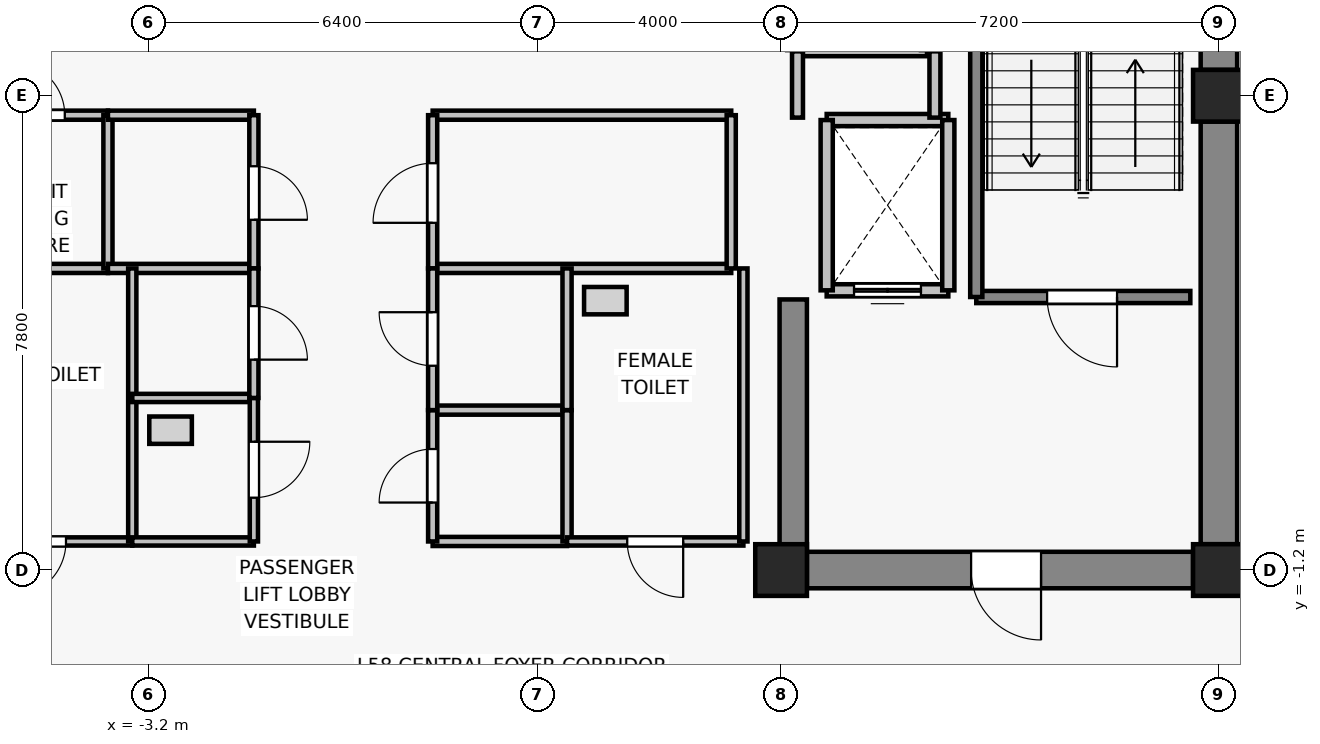
"""IFC4 building model, lengths in metres.
Left out: names, types, materials, properties, quantities, classifications, styles, units other than length and angle.
Written with IfcOpenShell. Run it as: python <this file> out.ifc"""

import sys

from ifc_helpers import new_model, si_unit, direction, frame, frame_2d, origin, origin_2d, place, context, subcontext, project, spatial, rectangle, extrude, source, transform, mapped, element, fill, save


model = new_model("IFC4")
c1 = context("Model", 3, precision=1e-05, world=origin(), true_north=direction((0.0, 1.0)))
c2 = subcontext(c1, "Body", "Model", "MODEL_VIEW")
j1 = project(units=[si_unit("LENGTHUNIT", "METRE"), si_unit("PLANEANGLEUNIT", "RADIAN")], contexts=[c1])
p1 = place(None, origin())
s1 = spatial("IfcSite", under=j1, at=p1, CompositionType="ELEMENT")
p2 = place(p1, origin())
s2 = spatial("IfcBuilding", under=s1, at=p2, CompositionType="ELEMENT")
p3 = place(p2, frame((0.0, 0.0, 208.9)))
s3 = spatial("IfcBuildingStorey", under=s2, at=p3, CompositionType="ELEMENT", Elevation=208.9)
for number, where, z_axis, x_axis in (
    (1, (7.2, -1.2, 0.0), (0.0, 0.0, 1.0), (1.0, 0.0, 0.0)),
    (2, (14.4, -1.2, 0.0), (0.0, 0.0, 1.0), (1.0, 0.0, 0.0)),
    (3, (14.4, 6.6, 0.0), (0.0, 0.0, 1.0), (1.0, 0.0, 0.0)),
):
    element("IfcColumn", number, at=place(p3, frame(where, z_axis=z_axis, x_axis=x_axis)), inside=s3, PredefinedType="COLUMN", context=c2, shape_type="SweptSolid", body=[
        extrude(rectangle(XDim=0.85, YDim=0.85, at=origin_2d()), origin(), (0.0, 0.0, 1.0), 3.3),
    ])
p4 = place(p3, frame((14.4, -0.775, 0.0), z_axis=(0.0, 0.0, 1.0), x_axis=(0.0, 1.0, 0.0)))
e4 = element("IfcWall", 4, at=p4, inside=s3, PredefinedType="SHEAR", context=c2, shape_type="SweptSolid", body=[
    extrude(rectangle(XDim=6.95, YDim=0.6, at=frame_2d((3.475, 0.0))), origin(), (0.0, 0.0, 1.0), 3.075),
])
p5 = place(p3, frame((14.4, 7.025, 0.0), z_axis=(0.0, 0.0, 1.0), x_axis=(0.0, 1.0, 0.0)))
e5 = element("IfcWall", 5, at=p5, inside=s3, PredefinedType="SHEAR", context=c2, shape_type="SweptSolid", body=[
    extrude(rectangle(XDim=6.05, YDim=0.6, at=frame_2d((3.025, 0.0))), origin(), (0.0, 0.0, 1.0), 3.075),
])
p6 = place(p3, frame((13.975, -1.2, 0.0), z_axis=(0.0, 0.0, 1.0), x_axis=(-1.0, 0.0, 0.0)))
e6 = element("IfcWall", 6, at=p6, inside=s3, PredefinedType="SHEAR", context=c2, shape_type="SweptSolid", body=[
    extrude(rectangle(XDim=6.35, YDim=0.6, at=frame_2d((3.175, 0.0))), origin(), (0.0, 0.0, 1.0), 3.075),
])
p7 = place(p6, frame((2.5, 0.0, 0.0)))
e7 = element("IfcOpeningElement", 7, at=p7, cuts=e6, PredefinedType="OPENING", context=c2, shape_type="SweptSolid", body=[
    extrude(rectangle(XDim=1.15, YDim=2.15, at=frame_2d((0.575, 1.075))), frame((0.0, 0.31, 0.0), z_axis=(0.0, -1.0, 0.0), x_axis=(1.0, 0.0, 0.0)), (0.0, 0.0, 1.0), 0.62),
])
p8 = place(p3, frame((7.4, -0.9, 0.0), z_axis=(0.0, 0.0, 1.0), x_axis=(0.0, 1.0, 0.0)))
e8 = element("IfcWall", 8, at=p8, inside=s3, PredefinedType="SHEAR", context=c2, shape_type="SweptSolid", body=[
    extrude(rectangle(XDim=4.15, YDim=0.45, at=frame_2d((2.075, 0.0))), origin(), (0.0, 0.0, 1.0), 3.075),
])
p9 = place(p3, frame((9.95, 3.4, 0.0), z_axis=(0.0, 0.0, 1.0), x_axis=(-1.0, 0.0, 0.0)))
e9 = element("IfcWall", 9, at=p9, inside=s3, PredefinedType="SOLIDWALL", context=c2, shape_type="SweptSolid", body=[
    extrude(rectangle(XDim=2.0, YDim=0.2, at=frame_2d((1.0, 0.0))), origin(), (0.0, 0.0, 1.0), 3.075),
])
p10 = place(p9, frame((0.45, 0.0, 0.0)))
e10 = element("IfcOpeningElement", 10, at=p10, cuts=e9, PredefinedType="OPENING", context=c2, shape_type="SweptSolid", body=[
    extrude(rectangle(XDim=1.1, YDim=2.2, at=frame_2d((0.55, 1.1))), frame((0.0, 0.11, 0.0), z_axis=(0.0, -1.0, 0.0), x_axis=(1.0, 0.0, 0.0)), (0.0, 0.0, 1.0), 0.22),
])
p11 = place(p3, frame((7.95, 6.2, 0.0), z_axis=(0.0, 0.0, 1.0), x_axis=(1.0, 0.0, 0.0)))
e11 = element("IfcWall", 11, at=p11, inside=s3, PredefinedType="SOLIDWALL", context=c2, shape_type="SweptSolid", body=[
    extrude(rectangle(XDim=2.0, YDim=0.2, at=frame_2d((1.0, 0.0))), origin(), (0.0, 0.0, 1.0), 3.075),
])
for number, where, z_axis, x_axis in (
    (12, (7.95, 3.4, 0.0), (0.0, 0.0, 1.0), (0.0, 1.0, 0.0)),
    (13, (9.95, 6.2, 0.0), (0.0, 0.0, 1.0), (0.0, -1.0, 0.0)),
):
    element("IfcWall", number, at=place(p3, frame(where, z_axis=z_axis, x_axis=x_axis)), inside=s3, PredefinedType="SOLIDWALL", context=c2, shape_type="SweptSolid", body=[
        extrude(rectangle(XDim=2.8, YDim=0.2, at=frame_2d((1.4, 0.0))), origin(), (0.0, 0.0, 1.0), 3.075),
    ])
p12 = place(p3, frame((9.6, 7.35, 0.0), z_axis=(0.0, 0.0, 1.0), x_axis=(-1.0, 0.0, 0.0)))
e14 = element("IfcWall", 14, at=p12, inside=s3, PredefinedType="SOLIDWALL", context=c2, shape_type="SweptSolid", body=[
    extrude(rectangle(XDim=2.2, YDim=0.2, at=frame_2d((1.1, 0.0))), origin(), (0.0, 0.0, 1.0), 2.615),
])
p13 = place(p3, frame((13.93, 3.29, 0.0), z_axis=(0.0, 0.0, 1.0), x_axis=(-1.0, 0.0, 0.0)))
e15 = element("IfcWall", 15, at=p13, inside=s3, PredefinedType="SOLIDWALL", context=c2, shape_type="SweptSolid", body=[
    extrude(rectangle(XDim=3.52, YDim=0.2, at=frame_2d((1.76, 0.0))), origin(), (0.0, 0.0, 1.0), 3.075),
])
p14 = place(p13, frame((1.205, 0.0, 0.0)))
e16 = element("IfcOpeningElement", 16, at=p14, cuts=e15, PredefinedType="OPENING", context=c2, shape_type="SweptSolid", body=[
    extrude(rectangle(XDim=1.15, YDim=2.15, at=frame_2d((0.575, 1.075))), frame((0.0, 0.11, 0.0), z_axis=(0.0, -1.0, 0.0), x_axis=(1.0, 0.0, 0.0)), (0.0, 0.0, 1.0), 0.22),
])
p15 = place(p3, frame((10.41, 3.29, 0.0), z_axis=(0.0, 0.0, 1.0), x_axis=(0.0, 1.0, 0.0)))
e17 = element("IfcWall", 17, at=p15, inside=s3, PredefinedType="SOLIDWALL", context=c2, shape_type="SweptSolid", body=[
    extrude(rectangle(XDim=8.84, YDim=0.2, at=frame_2d((4.42, 0.0))), origin(), (0.0, 0.0, 1.0), 3.075),
])
p16 = place(p3, frame((7.47, 6.24, 0.0), z_axis=(0.0, 0.0, 1.0), x_axis=(0.0, 1.0, 0.0)))
e18 = element("IfcWall", 18, at=p16, inside=s3, PredefinedType="PARTITIONING", context=c2, shape_type="SweptSolid", body=[
    extrude(rectangle(XDim=1.09, YDim=0.18, at=frame_2d((0.545, 0.0))), origin(), (0.0, 0.0, 1.0), 2.615),
])
p17 = place(p3, frame((9.73, 7.33, 0.0), z_axis=(0.0, 0.0, 1.0), x_axis=(0.0, -1.0, 0.0)))
e19 = element("IfcWall", 19, at=p17, inside=s3, PredefinedType="PARTITIONING", context=c2, shape_type="SweptSolid", body=[
    extrude(rectangle(XDim=1.09, YDim=0.18, at=frame_2d((0.545, 0.0))), origin(), (0.0, 0.0, 1.0), 3.075),
])
p18 = place(p3, frame((-3.87, 3.76, 0.0), z_axis=(0.0, 0.0, 1.0), x_axis=(-1.0, 0.0, 0.0)))
e20 = element("IfcWall", 20, at=p18, inside=s3, PredefinedType="PARTITIONING", context=c2, shape_type="SweptSolid", body=[
    extrude(rectangle(XDim=2.31, YDim=0.15, at=frame_2d((1.155, 0.0))), origin(), (0.0, 0.0, 1.0), 3.075),
])
p19 = place(p3, frame((-6.18, 6.28, 0.0), z_axis=(0.0, 0.0, 1.0), x_axis=(1.0, 0.0, 0.0)))
e21 = element("IfcWall", 21, at=p19, inside=s3, PredefinedType="PARTITIONING", context=c2, shape_type="SweptSolid", body=[
    extrude(rectangle(XDim=2.31, YDim=0.15, at=frame_2d((1.155, 0.0))), origin(), (0.0, 0.0, 1.0), 3.075),
])
p20 = place(p19, frame((0.72, 0.0, 0.0)))
e22 = element("IfcOpeningElement", 22, at=p20, cuts=e21, PredefinedType="OPENING", context=c2, shape_type="SweptSolid", body=[
    extrude(rectangle(XDim=0.88, YDim=2.1, at=frame_2d((0.44, 1.05))), frame((0.0, 0.085, 0.0), z_axis=(0.0, -1.0, 0.0), x_axis=(1.0, 0.0, 0.0)), (0.0, 0.0, 1.0), 0.17),
])
p21 = place(p3, frame((-3.87, 6.28, 0.0), z_axis=(0.0, 0.0, 1.0), x_axis=(0.0, -1.0, 0.0)))
e23 = element("IfcWall", 23, at=p21, inside=s3, PredefinedType="PARTITIONING", context=c2, shape_type="SweptSolid", body=[
    extrude(rectangle(XDim=2.52, YDim=0.15, at=frame_2d((1.26, 0.0))), origin(), (0.0, 0.0, 1.0), 3.075),
])
for number, where, z_axis, x_axis in (
    (24, (-1.47, 3.76, 0.0), (0.0, 0.0, 1.0), (-1.0, 0.0, 0.0)),
    (25, (-3.87, 6.28, 0.0), (0.0, 0.0, 1.0), (1.0, 0.0, 0.0)),
):
    element("IfcWall", number, at=place(p3, frame(where, z_axis=z_axis, x_axis=x_axis)), inside=s3, PredefinedType="PARTITIONING", context=c2, shape_type="SweptSolid", body=[
        extrude(rectangle(XDim=2.4, YDim=0.15, at=frame_2d((1.2, 0.0))), origin(), (0.0, 0.0, 1.0), 3.075),
    ])
p22 = place(p3, frame((-1.47, 6.28, 0.0), z_axis=(0.0, 0.0, 1.0), x_axis=(0.0, -1.0, 0.0)))
e26 = element("IfcWall", 26, at=p22, inside=s3, PredefinedType="PARTITIONING", context=c2, shape_type="SweptSolid", body=[
    extrude(rectangle(XDim=2.52, YDim=0.15, at=frame_2d((1.26, 0.0))), origin(), (0.0, 0.0, 1.0), 3.075),
])
p23 = place(p22, frame((0.84, 0.0, 0.0)))
e27 = element("IfcOpeningElement", 27, at=p23, cuts=e26, PredefinedType="OPENING", context=c2, shape_type="SweptSolid", body=[
    extrude(rectangle(XDim=0.88, YDim=2.1, at=frame_2d((0.44, 1.05))), frame((0.0, 0.085, 0.0), z_axis=(0.0, -1.0, 0.0), x_axis=(1.0, 0.0, 0.0)), (0.0, 0.0, 1.0), 0.17),
])
for number, where, z_axis, x_axis in (
    (28, (6.38, 3.76, 0.0), (0.0, 0.0, 1.0), (-1.0, 0.0, 0.0)),
    (29, (1.47, 6.28, 0.0), (0.0, 0.0, 1.0), (1.0, 0.0, 0.0)),
):
    element("IfcWall", number, at=place(p3, frame(where, z_axis=z_axis, x_axis=x_axis)), inside=s3, PredefinedType="PARTITIONING", context=c2, shape_type="SweptSolid", body=[
        extrude(rectangle(XDim=4.91, YDim=0.15, at=frame_2d((2.455, 0.0))), origin(), (0.0, 0.0, 1.0), 3.075),
    ])
p24 = place(p3, frame((1.47, 3.76, 0.0), z_axis=(0.0, 0.0, 1.0), x_axis=(0.0, 1.0, 0.0)))
e30 = element("IfcWall", 30, at=p24, inside=s3, PredefinedType="PARTITIONING", context=c2, shape_type="SweptSolid", body=[
    extrude(rectangle(XDim=2.52, YDim=0.15, at=frame_2d((1.26, 0.0))), origin(), (0.0, 0.0, 1.0), 3.075),
])
p25 = place(p24, frame((0.75, 0.0, 0.0)))
e31 = element("IfcOpeningElement", 31, at=p25, cuts=e30, PredefinedType="OPENING", context=c2, shape_type="SweptSolid", body=[
    extrude(rectangle(XDim=0.98, YDim=2.15, at=frame_2d((0.49, 1.075))), frame((0.0, 0.085, 0.0), z_axis=(0.0, -1.0, 0.0), x_axis=(1.0, 0.0, 0.0)), (0.0, 0.0, 1.0), 0.17),
])
p26 = place(p3, frame((6.38, 6.28, 0.0), z_axis=(0.0, 0.0, 1.0), x_axis=(0.0, -1.0, 0.0)))
e32 = element("IfcWall", 32, at=p26, inside=s3, PredefinedType="PARTITIONING", context=c2, shape_type="SweptSolid", body=[
    extrude(rectangle(XDim=2.52, YDim=0.15, at=frame_2d((1.26, 0.0))), origin(), (0.0, 0.0, 1.0), 3.075),
])
p27 = place(p3, frame((-3.47, -0.73, 0.0), z_axis=(0.0, 0.0, 1.0), x_axis=(-1.0, 0.0, 0.0)))
e33 = element("IfcWall", 33, at=p27, inside=s3, PredefinedType="PARTITIONING", context=c2, shape_type="SweptSolid", body=[
    extrude(rectangle(XDim=3.11, YDim=0.135, at=frame_2d((1.555, 0.0))), origin(), (0.0, 0.0, 1.0), 3.075),
])
p28 = place(p27, frame((1.09, 0.0, 0.0)))
e34 = element("IfcOpeningElement", 34, at=p28, cuts=e33, PredefinedType="OPENING", context=c2, shape_type="SweptSolid", body=[
    extrude(rectangle(XDim=0.92, YDim=2.1, at=frame_2d((0.46, 1.05))), frame((0.0, 0.077, 0.0), z_axis=(0.0, -1.0, 0.0), x_axis=(1.0, 0.0, 0.0)), (0.0, 0.0, 1.0), 0.155),
])
p29 = place(p3, frame((-3.47, 3.76, 0.0), z_axis=(0.0, 0.0, 1.0), x_axis=(0.0, -1.0, 0.0)))
e35 = element("IfcWall", 35, at=p29, inside=s3, PredefinedType="PARTITIONING", context=c2, shape_type="SweptSolid", body=[
    extrude(rectangle(XDim=4.49, YDim=0.135, at=frame_2d((2.245, 0.0))), origin(), (0.0, 0.0, 1.0), 3.075),
])
for number, where, z_axis, x_axis in (
    (36, (-1.47, -0.73, 0.0), (0.0, 0.0, 1.0), (-1.0, 0.0, 0.0)),
    (37, (-3.47, 1.63, 0.0), (0.0, 0.0, 1.0), (1.0, 0.0, 0.0)),
):
    element("IfcWall", number, at=place(p3, frame(where, z_axis=z_axis, x_axis=x_axis)), inside=s3, PredefinedType="PARTITIONING", context=c2, shape_type="SweptSolid", body=[
        extrude(rectangle(XDim=2.0, YDim=0.135, at=frame_2d((1.0, 0.0))), origin(), (0.0, 0.0, 1.0), 3.075),
    ])
p30 = place(p3, frame((-1.47, 1.63, 0.0), z_axis=(0.0, 0.0, 1.0), x_axis=(0.0, -1.0, 0.0)))
e38 = element("IfcWall", 38, at=p30, inside=s3, PredefinedType="PARTITIONING", context=c2, shape_type="SweptSolid", body=[
    extrude(rectangle(XDim=2.36, YDim=0.135, at=frame_2d((1.18, 0.0))), origin(), (0.0, 0.0, 1.0), 3.075),
])
p31 = place(p30, frame((0.72, 0.0, 0.0)))
e39 = element("IfcOpeningElement", 39, at=p31, cuts=e38, PredefinedType="OPENING", context=c2, shape_type="SweptSolid", body=[
    extrude(rectangle(XDim=0.92, YDim=2.1, at=frame_2d((0.46, 1.05))), frame((0.0, 0.077, 0.0), z_axis=(0.0, -1.0, 0.0), x_axis=(1.0, 0.0, 0.0)), (0.0, 0.0, 1.0), 0.155),
])
p32 = place(p3, frame((-1.47, 3.76, 0.0), z_axis=(0.0, 0.0, 1.0), x_axis=(0.0, -1.0, 0.0)))
e40 = element("IfcWall", 40, at=p32, inside=s3, PredefinedType="PARTITIONING", context=c2, shape_type="SweptSolid", body=[
    extrude(rectangle(XDim=2.13, YDim=0.15, at=frame_2d((1.065, 0.0))), origin(), (0.0, 0.0, 1.0), 3.075),
])
p33 = place(p32, frame((0.62, 0.0, 0.0)))
e41 = element("IfcOpeningElement", 41, at=p33, cuts=e40, PredefinedType="OPENING", context=c2, shape_type="SweptSolid", body=[
    extrude(rectangle(XDim=0.88, YDim=2.1, at=frame_2d((0.44, 1.05))), frame((0.0, 0.085, 0.0), z_axis=(0.0, -1.0, 0.0), x_axis=(1.0, 0.0, 0.0)), (0.0, 0.0, 1.0), 0.17),
])
for number, where, z_axis, x_axis in (
    (42, (3.68, -0.73, 0.0), (0.0, 0.0, 1.0), (-1.0, 0.0, 0.0)),
    (43, (1.47, 1.43, 0.0), (0.0, 0.0, 1.0), (1.0, 0.0, 0.0)),
):
    element("IfcWall", number, at=place(p3, frame(where, z_axis=z_axis, x_axis=x_axis)), inside=s3, PredefinedType="PARTITIONING", context=c2, shape_type="SweptSolid", body=[
        extrude(rectangle(XDim=2.21, YDim=0.15, at=frame_2d((1.105, 0.0))), origin(), (0.0, 0.0, 1.0), 3.075),
    ])
p34 = place(p3, frame((1.47, -0.73, 0.0), z_axis=(0.0, 0.0, 1.0), x_axis=(0.0, 1.0, 0.0)))
e44 = element("IfcWall", 44, at=p34, inside=s3, PredefinedType="PARTITIONING", context=c2, shape_type="SweptSolid", body=[
    extrude(rectangle(XDim=2.16, YDim=0.15, at=frame_2d((1.08, 0.0))), origin(), (0.0, 0.0, 1.0), 3.075),
])
p35 = place(p34, frame((0.64, 0.0, 0.0)))
e45 = element("IfcOpeningElement", 45, at=p35, cuts=e44, PredefinedType="OPENING", context=c2, shape_type="SweptSolid", body=[
    extrude(rectangle(XDim=0.88, YDim=2.1, at=frame_2d((0.44, 1.05))), frame((0.0, 0.085, 0.0), z_axis=(0.0, -1.0, 0.0), x_axis=(1.0, 0.0, 0.0)), (0.0, 0.0, 1.0), 0.17),
])
p36 = place(p3, frame((3.68, 1.43, 0.0), z_axis=(0.0, 0.0, 1.0), x_axis=(0.0, -1.0, 0.0)))
e46 = element("IfcWall", 46, at=p36, inside=s3, PredefinedType="PARTITIONING", context=c2, shape_type="SweptSolid", body=[
    extrude(rectangle(XDim=2.16, YDim=0.15, at=frame_2d((1.08, 0.0))), origin(), (0.0, 0.0, 1.0), 3.075),
])
p37 = place(p3, frame((1.47, 1.43, 0.0), z_axis=(0.0, 0.0, 1.0), x_axis=(0.0, 1.0, 0.0)))
e47 = element("IfcWall", 47, at=p37, inside=s3, PredefinedType="PARTITIONING", context=c2, shape_type="SweptSolid", body=[
    extrude(rectangle(XDim=2.33, YDim=0.15, at=frame_2d((1.165, 0.0))), origin(), (0.0, 0.0, 1.0), 3.075),
])
p38 = place(p37, frame((0.73, 0.0, 0.0)))
e48 = element("IfcOpeningElement", 48, at=p38, cuts=e47, PredefinedType="OPENING", context=c2, shape_type="SweptSolid", body=[
    extrude(rectangle(XDim=0.88, YDim=2.15, at=frame_2d((0.44, 1.075))), frame((0.0, 0.085, 0.0), z_axis=(0.0, -1.0, 0.0), x_axis=(1.0, 0.0, 0.0)), (0.0, 0.0, 1.0), 0.17),
])
p39 = place(p3, frame((3.68, 3.76, 0.0), z_axis=(0.0, 0.0, 1.0), x_axis=(0.0, -1.0, 0.0)))
e49 = element("IfcWall", 49, at=p39, inside=s3, PredefinedType="PARTITIONING", context=c2, shape_type="SweptSolid", body=[
    extrude(rectangle(XDim=2.33, YDim=0.15, at=frame_2d((1.165, 0.0))), origin(), (0.0, 0.0, 1.0), 3.075),
])
p40 = place(p3, frame((6.58, -0.73, 0.0), z_axis=(0.0, 0.0, 1.0), x_axis=(-1.0, 0.0, 0.0)))
e50 = element("IfcWall", 50, at=p40, inside=s3, PredefinedType="PARTITIONING", context=c2, shape_type="SweptSolid", body=[
    extrude(rectangle(XDim=2.9, YDim=0.135, at=frame_2d((1.45, 0.0))), origin(), (0.0, 0.0, 1.0), 3.075),
])
p41 = place(p40, frame((0.99, 0.0, 0.0)))
e51 = element("IfcOpeningElement", 51, at=p41, cuts=e50, PredefinedType="OPENING", context=c2, shape_type="SweptSolid", body=[
    extrude(rectangle(XDim=0.92, YDim=2.1, at=frame_2d((0.46, 1.05))), frame((0.0, 0.077, 0.0), z_axis=(0.0, -1.0, 0.0), x_axis=(1.0, 0.0, 0.0)), (0.0, 0.0, 1.0), 0.155),
])
p42 = place(p3, frame((6.58, 3.76, 0.0), z_axis=(0.0, 0.0, 1.0), x_axis=(0.0, -1.0, 0.0)))
e52 = element("IfcWall", 52, at=p42, inside=s3, PredefinedType="PARTITIONING", context=c2, shape_type="SweptSolid", body=[
    extrude(rectangle(XDim=4.49, YDim=0.135, at=frame_2d((2.245, 0.0))), origin(), (0.0, 0.0, 1.0), 3.075),
])
m1 = source(origin(), c2, "Body", "SweptSolid", [
    extrude(rectangle(XDim=1.1, YDim=2.2, at=frame_2d((0.55, 1.1))), frame((0.0, 0.025, 0.0), z_axis=(0.0, -1.0, 0.0), x_axis=(1.0, 0.0, 0.0)), (0.0, 0.0, 1.0), 0.05),
])
p43 = place(p10, origin())
e53 = element("IfcDoor", 53, at=p43, inside=s3, OperationType="DOUBLE_DOOR_SLIDING", PredefinedType="DOOR", context=c2, shape_type="MappedRepresentation", body=[
    mapped(m1, transform((0.0, 0.0, 0.0), x_axis=(1.0, 0.0, 0.0), y_axis=(0.0, 1.0, 0.0), z_axis=(0.0, 0.0, 1.0), scale=1.0)),
])
fill(e10, e53)
m2 = source(origin(), c2, "Body", "SweptSolid", [
    extrude(rectangle(XDim=1.15, YDim=2.15, at=frame_2d((0.575, 1.075))), frame((0.0, 0.025, 0.0), z_axis=(0.0, -1.0, 0.0), x_axis=(1.0, 0.0, 0.0)), (0.0, 0.0, 1.0), 0.05),
])
p44 = place(p14, origin())
e54 = element("IfcDoor", 54, at=p44, inside=s3, OperationType="SINGLE_SWING_LEFT", PredefinedType="DOOR", context=c2, shape_type="MappedRepresentation", body=[
    mapped(m2, transform((0.0, 0.0, 0.0), x_axis=(1.0, 0.0, 0.0), y_axis=(0.0, 1.0, 0.0), z_axis=(0.0, 0.0, 1.0), scale=1.0)),
])
fill(e16, e54)
p45 = place(p7, origin())
e55 = element("IfcDoor", 55, at=p45, inside=s3, OperationType="SINGLE_SWING_LEFT", PredefinedType="DOOR", context=c2, shape_type="MappedRepresentation", body=[
    mapped(m2, transform((0.0, 0.0, 0.0), x_axis=(1.0, 0.0, 0.0), y_axis=(0.0, 1.0, 0.0), z_axis=(0.0, 0.0, 1.0), scale=1.0)),
])
fill(e7, e55)
m3 = source(origin(), c2, "Body", "SweptSolid", [
    extrude(rectangle(XDim=0.88, YDim=2.1, at=frame_2d((0.44, 1.05))), frame((0.0, 0.025, 0.0), z_axis=(0.0, -1.0, 0.0), x_axis=(1.0, 0.0, 0.0)), (0.0, 0.0, 1.0), 0.05),
])
p46 = place(p20, origin())
e56 = element("IfcDoor", 56, at=p46, inside=s3, OperationType="SINGLE_SWING_LEFT", PredefinedType="DOOR", context=c2, shape_type="MappedRepresentation", body=[
    mapped(m3, transform((0.0, 0.0, 0.0), x_axis=(1.0, 0.0, 0.0), y_axis=(0.0, 1.0, 0.0), z_axis=(0.0, 0.0, 1.0), scale=1.0)),
])
fill(e22, e56)
p47 = place(p23, origin())
e57 = element("IfcDoor", 57, at=p47, inside=s3, OperationType="SINGLE_SWING_RIGHT", PredefinedType="DOOR", context=c2, shape_type="MappedRepresentation", body=[
    mapped(m3, transform((0.0, 0.0, 0.0), x_axis=(1.0, 0.0, 0.0), y_axis=(0.0, 1.0, 0.0), z_axis=(0.0, 0.0, 1.0), scale=1.0)),
])
fill(e27, e57)
m4 = source(origin(), c2, "Body", "SweptSolid", [
    extrude(rectangle(XDim=0.98, YDim=2.15, at=frame_2d((0.49, 1.075))), frame((0.0, 0.025, 0.0), z_axis=(0.0, -1.0, 0.0), x_axis=(1.0, 0.0, 0.0)), (0.0, 0.0, 1.0), 0.05),
])
p48 = place(p25, origin())
e58 = element("IfcDoor", 58, at=p48, inside=s3, OperationType="SINGLE_SWING_LEFT", PredefinedType="DOOR", context=c2, shape_type="MappedRepresentation", body=[
    mapped(m4, transform((0.0, 0.0, 0.0), x_axis=(1.0, 0.0, 0.0), y_axis=(0.0, 1.0, 0.0), z_axis=(0.0, 0.0, 1.0), scale=1.0)),
])
fill(e31, e58)
m5 = source(origin(), c2, "Body", "SweptSolid", [
    extrude(rectangle(XDim=0.92, YDim=2.1, at=frame_2d((0.46, 1.05))), frame((0.0, 0.025, 0.0), z_axis=(0.0, -1.0, 0.0), x_axis=(1.0, 0.0, 0.0)), (0.0, 0.0, 1.0), 0.05),
])
p49 = place(p28, origin())
e59 = element("IfcDoor", 59, at=p49, inside=s3, OperationType="SINGLE_SWING_RIGHT", PredefinedType="DOOR", context=c2, shape_type="MappedRepresentation", body=[
    mapped(m5, transform((0.0, 0.0, 0.0), x_axis=(1.0, 0.0, 0.0), y_axis=(0.0, 1.0, 0.0), z_axis=(0.0, 0.0, 1.0), scale=1.0)),
])
fill(e34, e59)
p50 = place(p31, origin())
e60 = element("IfcDoor", 60, at=p50, inside=s3, OperationType="SINGLE_SWING_LEFT", PredefinedType="DOOR", context=c2, shape_type="MappedRepresentation", body=[
    mapped(m5, transform((0.0, 0.0, 0.0), x_axis=(1.0, 0.0, 0.0), y_axis=(0.0, 1.0, 0.0), z_axis=(0.0, 0.0, 1.0), scale=1.0)),
])
fill(e39, e60)
p51 = place(p33, origin())
e61 = element("IfcDoor", 61, at=p51, inside=s3, OperationType="SINGLE_SWING_RIGHT", PredefinedType="DOOR", context=c2, shape_type="MappedRepresentation", body=[
    mapped(m3, transform((0.0, 0.0, 0.0), x_axis=(1.0, 0.0, 0.0), y_axis=(0.0, 1.0, 0.0), z_axis=(0.0, 0.0, 1.0), scale=1.0)),
])
fill(e41, e61)
p52 = place(p35, origin())
e62 = element("IfcDoor", 62, at=p52, inside=s3, OperationType="SINGLE_SWING_LEFT", PredefinedType="DOOR", context=c2, shape_type="MappedRepresentation", body=[
    mapped(m3, transform((0.0, 0.0, 0.0), x_axis=(1.0, 0.0, 0.0), y_axis=(0.0, 1.0, 0.0), z_axis=(0.0, 0.0, 1.0), scale=1.0)),
])
fill(e45, e62)
m6 = source(origin(), c2, "Body", "SweptSolid", [
    extrude(rectangle(XDim=0.88, YDim=2.15, at=frame_2d((0.44, 1.075))), frame((0.0, 0.025, 0.0), z_axis=(0.0, -1.0, 0.0), x_axis=(1.0, 0.0, 0.0)), (0.0, 0.0, 1.0), 0.05),
])
p53 = place(p38, origin())
e63 = element("IfcDoor", 63, at=p53, inside=s3, OperationType="SINGLE_SWING_RIGHT", PredefinedType="DOOR", context=c2, shape_type="MappedRepresentation", body=[
    mapped(m6, transform((0.0, 0.0, 0.0), x_axis=(1.0, 0.0, 0.0), y_axis=(0.0, 1.0, 0.0), z_axis=(0.0, 0.0, 1.0), scale=1.0)),
])
fill(e48, e63)
p54 = place(p41, origin())
e64 = element("IfcDoor", 64, at=p54, inside=s3, OperationType="SINGLE_SWING_LEFT", PredefinedType="DOOR", context=c2, shape_type="MappedRepresentation", body=[
    mapped(m5, transform((0.0, 0.0, 0.0), x_axis=(1.0, 0.0, 0.0), y_axis=(0.0, 1.0, 0.0), z_axis=(0.0, 0.0, 1.0), scale=1.0)),
])
fill(e51, e64)
save(model, sys.argv[1])
